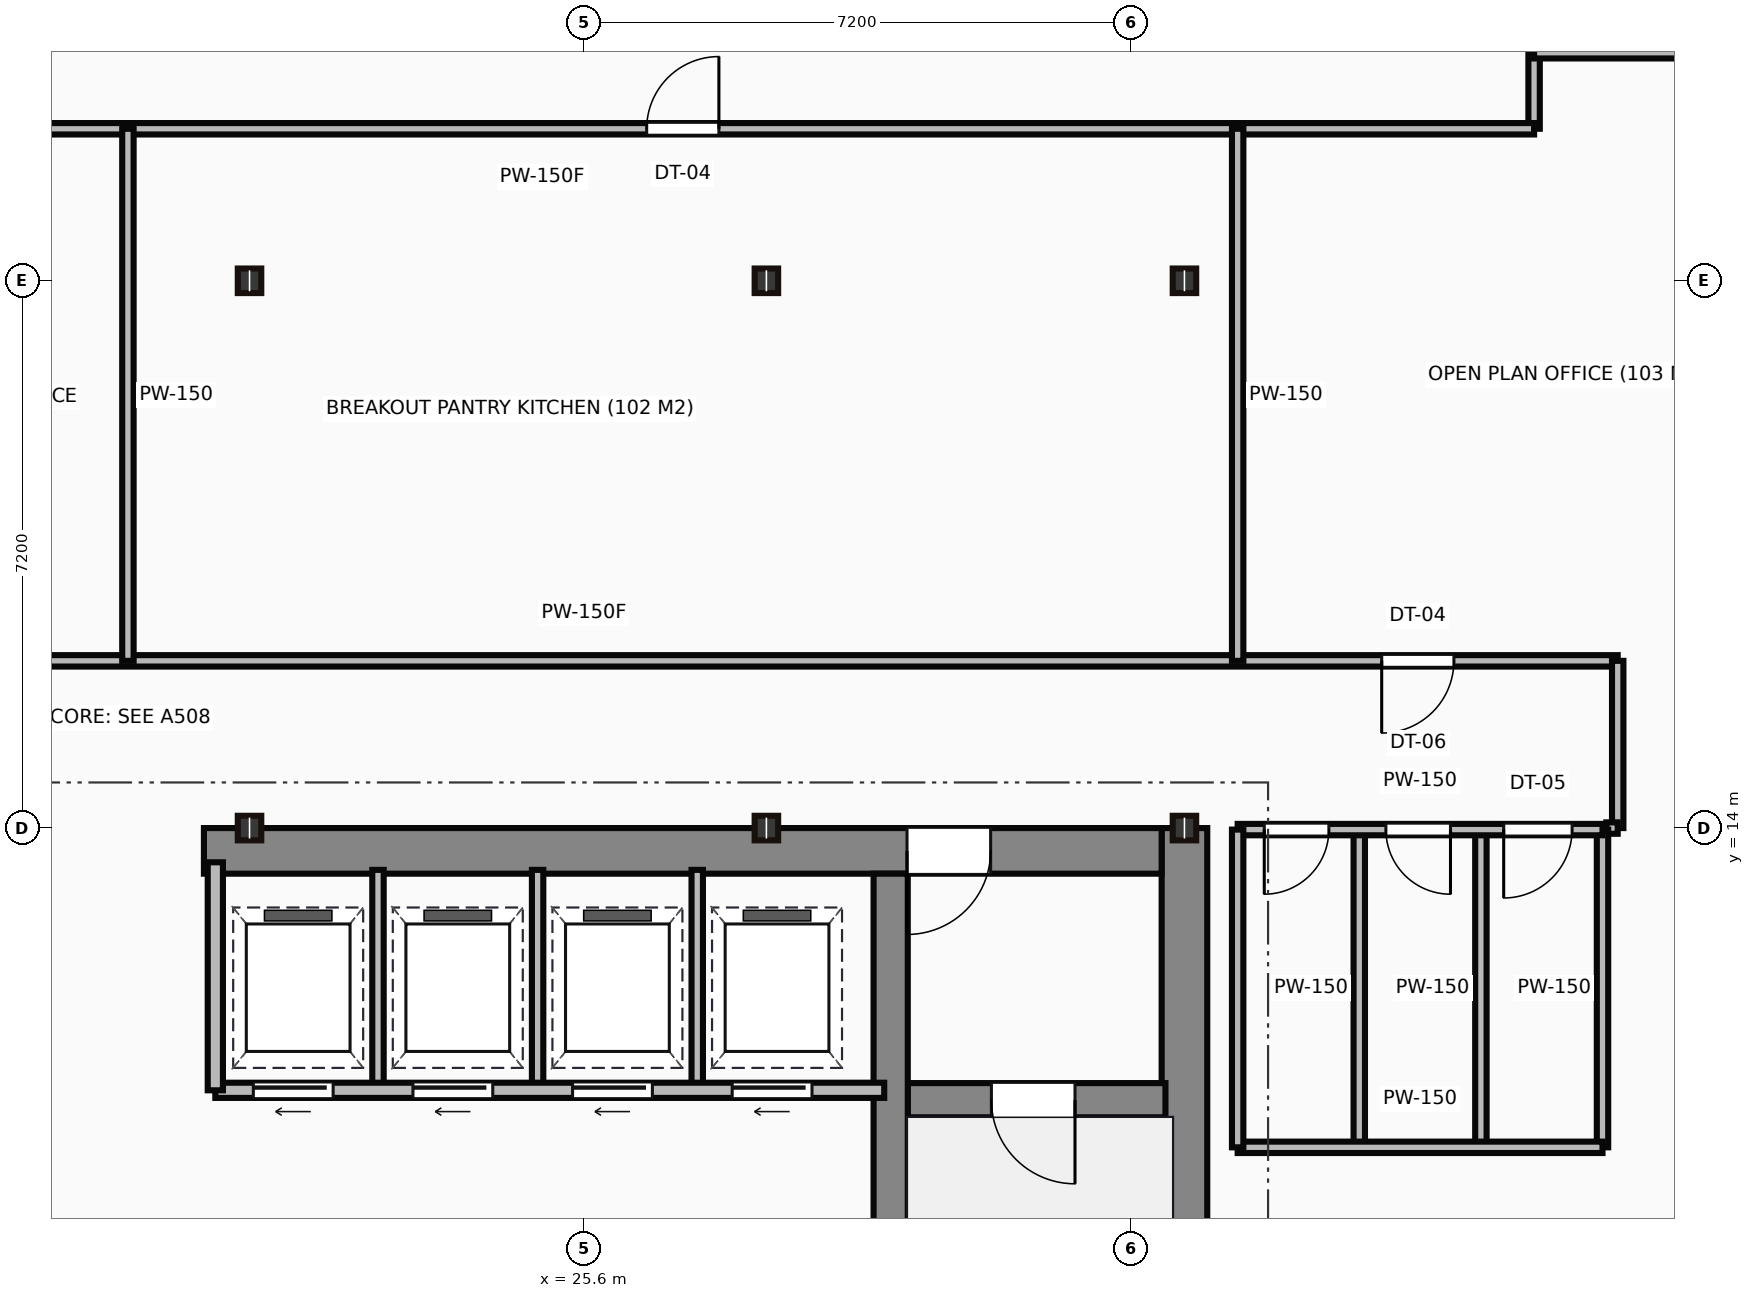
"""IFC4 building model, lengths in metres.
Left out: names, types, materials, properties, quantities, classifications, styles, units other than length and angle.
Written with IfcOpenShell. Run it as: python <this file> out.ifc"""

import sys

from ifc_helpers import new_model, si_unit, direction, frame, frame_2d, origin, origin_2d, place, context, subcontext, project, spatial, rectangle, i_section, extrude, source, transform, mapped, element, fill, save


model = new_model("IFC4")
c1 = context("Model", 3, precision=1e-05, world=origin(), true_north=direction((0.0, 1.0)))
c2 = subcontext(c1, "Body", "Model", "MODEL_VIEW")
j1 = project(units=[si_unit("LENGTHUNIT", "METRE"), si_unit("PLANEANGLEUNIT", "RADIAN")], contexts=[c1])
p1 = place(None, origin())
s1 = spatial("IfcSite", under=j1, at=p1, CompositionType="ELEMENT")
p2 = place(p1, origin())
s2 = spatial("IfcBuilding", under=s1, at=p2, CompositionType="ELEMENT")
p3 = place(p2, frame((0.0, 0.0, 188.6)))
s3 = spatial("IfcBuildingStorey", under=s2, at=p3, CompositionType="ELEMENT", Elevation=188.6)
m1 = source(origin(), c2, "Body", "SweptSolid", [
    extrude(rectangle(XDim=13.1, YDim=0.6, at=frame_2d((6.55, 0.0))), origin(), (0.0, 0.0, 1.0), 3.65),
])
p4 = place(p3, frame((33.5, 0.9, 0.0), z_axis=(0.0, 0.0, 1.0), x_axis=(0.0, 1.0, 0.0)))
e1 = element("IfcWall", 1, at=p4, inside=s3, PredefinedType="SHEAR", context=c2, shape_type="MappedRepresentation", body=[
    mapped(m1, transform((0.0, 0.0, 0.0))),
])
m2 = source(origin(), c2, "Body", "SweptSolid", [
    extrude(rectangle(XDim=12.6, YDim=0.6, at=frame_2d((6.3, 0.0))), origin(), (0.0, 0.0, 1.0), 3.65),
])
p5 = place(p3, frame((20.6, 13.7, 0.0), z_axis=(0.0, 0.0, 1.0), x_axis=(1.0, 0.0, 0.0)))
e2 = element("IfcWall", 2, at=p5, inside=s3, PredefinedType="SHEAR", context=c2, shape_type="MappedRepresentation", body=[
    mapped(m2, transform((0.0, 0.0, 0.0))),
])
p6 = place(p5, frame((9.25, 0.0, 0.0)))
e3 = element("IfcOpeningElement", 3, at=p6, cuts=e2, PredefinedType="OPENING", context=c2, shape_type="SweptSolid", body=[
    extrude(rectangle(XDim=1.1, YDim=2.15, at=frame_2d((0.55, 1.075))), frame((0.0, 0.31, 0.0), z_axis=(0.0, -1.0, 0.0), x_axis=(1.0, 0.0, 0.0)), (0.0, 0.0, 1.0), 0.62),
])
m3 = source(origin(), c2, "Body", "SweptSolid", [
    extrude(rectangle(XDim=12.5, YDim=0.45, at=frame_2d((6.25, 0.0))), origin(), (0.0, 0.0, 1.0), 3.65),
])
p7 = place(p3, frame((29.635, 0.9, 0.0), z_axis=(0.0, 0.0, 1.0), x_axis=(0.0, 1.0, 0.0)))
e4 = element("IfcWall", 4, at=p7, inside=s3, PredefinedType="SHEAR", context=c2, shape_type="MappedRepresentation", body=[
    mapped(m3, transform((0.0, 0.0, 0.0))),
])
m4 = source(origin(), c2, "Body", "SweptSolid", [
    extrude(rectangle(XDim=3.39, YDim=0.45, at=frame_2d((1.695, 0.0))), origin(), (0.0, 0.0, 1.0), 3.65),
])
p8 = place(p3, frame((29.86, 10.42, 0.0), z_axis=(0.0, 0.0, 1.0), x_axis=(1.0, 0.0, 0.0)))
e5 = element("IfcWall", 5, at=p8, inside=s3, PredefinedType="SHEAR", context=c2, shape_type="MappedRepresentation", body=[
    mapped(m4, transform((0.0, 0.0, 0.0))),
])
p9 = place(p8, frame((1.1, 0.0, 0.0)))
e6 = element("IfcOpeningElement", 6, at=p9, cuts=e5, PredefinedType="OPENING", context=c2, shape_type="SweptSolid", body=[
    extrude(rectangle(XDim=1.1, YDim=2.15, at=frame_2d((0.55, 1.075))), frame((0.0, 0.235, 0.0), z_axis=(0.0, -1.0, 0.0), x_axis=(1.0, 0.0, 0.0)), (0.0, 0.0, 1.0), 0.47),
])
m5 = source(origin(), c2, "Body", "SweptSolid", [
    extrude(i_section(OverallWidth=0.309, OverallDepth=0.323, WebThickness=0.014, FlangeThickness=0.023, at=origin_2d()), origin(), (0.0, 0.0, 1.0), 3.65),
])
for number, where, z_axis, x_axis in (
    (7, (21.2, 14.0, 0.0), (0.0, 0.0, 1.0), (1.0, 0.0, 0.0)),
    (8, (21.2, 21.2, 0.0), (0.0, 0.0, 1.0), (1.0, 0.0, 0.0)),
    (9, (28.0, 14.0, 0.0), (0.0, 0.0, 1.0), (1.0, 0.0, 0.0)),
    (10, (28.0, 21.2, 0.0), (0.0, 0.0, 1.0), (1.0, 0.0, 0.0)),
    (11, (33.5, 14.0, 0.0), (0.0, 0.0, 1.0), (1.0, 0.0, 0.0)),
    (12, (33.5, 21.2, 0.0), (0.0, 0.0, 1.0), (1.0, 0.0, 0.0)),
):
    element("IfcColumn", number, at=place(p3, frame(where, z_axis=z_axis, x_axis=x_axis)), inside=s3, PredefinedType="COLUMN", context=c2, shape_type="MappedRepresentation", body=[
        mapped(m5, transform((0.0, 0.0, 0.0))),
    ])
m6 = source(origin(), c2, "Body", "SweptSolid", [
    extrude(rectangle(XDim=8.8, YDim=0.2, at=frame_2d((4.4, 0.0))), origin(), (0.0, 0.0, 1.0), 3.4),
])
p10 = place(p3, frame((20.75, 10.55, 0.0), z_axis=(0.0, 0.0, 1.0), x_axis=(1.0, 0.0, 0.0)))
e13 = element("IfcWall", 13, at=p10, inside=s3, PredefinedType="PARTITIONING", context=c2, shape_type="MappedRepresentation", body=[
    mapped(m6, transform((0.0, 0.0, 0.0))),
])
p11 = place(p10, frame((0.5, 0.0, 0.0)))
e14 = element("IfcOpeningElement", 14, at=p11, cuts=e13, PredefinedType="OPENING", context=c2, shape_type="SweptSolid", body=[
    extrude(rectangle(XDim=1.05, YDim=2.15, at=frame_2d((0.525, 1.075))), frame((0.0, 0.11, 0.0), z_axis=(0.0, -1.0, 0.0), x_axis=(1.0, 0.0, 0.0)), (0.0, 0.0, 1.0), 0.22),
])
p12 = place(p10, frame((2.6, 0.0, 0.0)))
e15 = element("IfcOpeningElement", 15, at=p12, cuts=e13, PredefinedType="OPENING", context=c2, shape_type="SweptSolid", body=[
    extrude(rectangle(XDim=1.05, YDim=2.15, at=frame_2d((0.525, 1.075))), frame((0.0, 0.11, 0.0), z_axis=(0.0, -1.0, 0.0), x_axis=(1.0, 0.0, 0.0)), (0.0, 0.0, 1.0), 0.22),
])
p13 = place(p10, frame((4.7, 0.0, 0.0)))
e16 = element("IfcOpeningElement", 16, at=p13, cuts=e13, PredefinedType="OPENING", context=c2, shape_type="SweptSolid", body=[
    extrude(rectangle(XDim=1.05, YDim=2.15, at=frame_2d((0.525, 1.075))), frame((0.0, 0.11, 0.0), z_axis=(0.0, -1.0, 0.0), x_axis=(1.0, 0.0, 0.0)), (0.0, 0.0, 1.0), 0.22),
])
p14 = place(p10, frame((6.8, 0.0, 0.0)))
e17 = element("IfcOpeningElement", 17, at=p14, cuts=e13, PredefinedType="OPENING", context=c2, shape_type="SweptSolid", body=[
    extrude(rectangle(XDim=1.05, YDim=2.15, at=frame_2d((0.525, 1.075))), frame((0.0, 0.11, 0.0), z_axis=(0.0, -1.0, 0.0), x_axis=(1.0, 0.0, 0.0)), (0.0, 0.0, 1.0), 0.22),
])
m7 = source(origin(), c2, "Body", "SweptSolid", [
    extrude(rectangle(XDim=3.0, YDim=0.2, at=frame_2d((1.5, 0.0))), origin(), (0.0, 0.0, 1.0), 3.4),
])
p15 = place(p3, frame((20.75, 10.55, 0.0), z_axis=(0.0, 0.0, 1.0), x_axis=(0.0, 1.0, 0.0)))
e18 = element("IfcWall", 18, at=p15, inside=s3, PredefinedType="PARTITIONING", context=c2, shape_type="MappedRepresentation", body=[
    mapped(m7, transform((0.0, 0.0, 0.0))),
])
m8 = source(origin(), c2, "Body", "SweptSolid", [
    extrude(rectangle(XDim=2.85, YDim=0.15, at=frame_2d((1.425, 0.0))), origin(), (0.0, 0.0, 1.0), 3.4),
])
for number, where, z_axis, x_axis in (
    (19, (22.89, 10.6, 0.0), (0.0, 0.0, 1.0), (0.0, 1.0, 0.0)),
    (20, (24.99, 10.6, 0.0), (0.0, 0.0, 1.0), (0.0, 1.0, 0.0)),
    (21, (27.09, 10.6, 0.0), (0.0, 0.0, 1.0), (0.0, 1.0, 0.0)),
):
    element("IfcWall", number, at=place(p3, frame(where, z_axis=z_axis, x_axis=x_axis)), inside=s3, PredefinedType="PARTITIONING", context=c2, shape_type="MappedRepresentation", body=[
        mapped(m8, transform((0.0, 0.0, 0.0))),
    ])
m9 = source(origin(), c2, "Body", "SweptSolid", [
    extrude(rectangle(XDim=4.8, YDim=0.15, at=frame_2d((2.4, 0.0))), origin(), (0.0, 0.0, 1.0), 2.787),
])
p16 = place(p3, frame((34.2, 13.98, 0.0), z_axis=(0.0, 0.0, 1.0), x_axis=(1.0, 0.0, 0.0)))
e22 = element("IfcWall", 22, at=p16, inside=s3, PredefinedType="PARTITIONING", context=c2, shape_type="MappedRepresentation", body=[
    mapped(m9, transform((0.0, 0.0, 0.0))),
])
p17 = place(p16, frame((0.35, 0.0, 0.0)))
e23 = element("IfcOpeningElement", 23, at=p17, cuts=e22, PredefinedType="OPENING", context=c2, shape_type="SweptSolid", body=[
    extrude(rectangle(XDim=0.85, YDim=2.1, at=frame_2d((0.425, 1.05))), frame((0.0, 0.085, 0.0), z_axis=(0.0, -1.0, 0.0), x_axis=(1.0, 0.0, 0.0)), (0.0, 0.0, 1.0), 0.17),
])
p18 = place(p16, frame((1.95, 0.0, 0.0)))
e24 = element("IfcOpeningElement", 24, at=p18, cuts=e22, PredefinedType="OPENING", context=c2, shape_type="SweptSolid", body=[
    extrude(rectangle(XDim=0.85, YDim=2.1, at=frame_2d((0.425, 1.05))), frame((0.0, 0.085, 0.0), z_axis=(0.0, -1.0, 0.0), x_axis=(1.0, 0.0, 0.0)), (0.0, 0.0, 1.0), 0.17),
])
p19 = place(p16, frame((3.5, 0.0, 0.0)))
e25 = element("IfcOpeningElement", 25, at=p19, cuts=e22, PredefinedType="OPENING", context=c2, shape_type="SweptSolid", body=[
    extrude(rectangle(XDim=0.9, YDim=2.1, at=frame_2d((0.45, 1.05))), frame((0.0, 0.085, 0.0), z_axis=(0.0, -1.0, 0.0), x_axis=(1.0, 0.0, 0.0)), (0.0, 0.0, 1.0), 0.17),
])
m10 = source(origin(), c2, "Body", "SweptSolid", [
    extrude(rectangle(XDim=4.8, YDim=0.15, at=frame_2d((2.4, 0.0))), origin(), (0.0, 0.0, 1.0), 3.4),
])
p20 = place(p3, frame((34.2, 9.8, 0.0), z_axis=(0.0, 0.0, 1.0), x_axis=(1.0, 0.0, 0.0)))
e26 = element("IfcWall", 26, at=p20, inside=s3, PredefinedType="PARTITIONING", context=c2, shape_type="MappedRepresentation", body=[
    mapped(m10, transform((0.0, 0.0, 0.0))),
])
m11 = source(origin(), c2, "Body", "SweptSolid", [
    extrude(rectangle(XDim=4.18, YDim=0.15, at=frame_2d((2.09, 0.0))), origin(), (0.0, 0.0, 1.0), 3.4),
])
for number, where, z_axis, x_axis in (
    (27, (39.0, 9.8, 0.0), (0.0, 0.0, 1.0), (0.0, 1.0, 0.0)),
    (28, (34.2, 9.8, 0.0), (0.0, 0.0, 1.0), (0.0, 1.0, 0.0)),
    (29, (35.8, 9.8, 0.0), (0.0, 0.0, 1.0), (0.0, 1.0, 0.0)),
    (30, (37.4, 9.8, 0.0), (0.0, 0.0, 1.0), (0.0, 1.0, 0.0)),
):
    element("IfcWall", number, at=place(p3, frame(where, z_axis=z_axis, x_axis=x_axis)), inside=s3, PredefinedType="PARTITIONING", context=c2, shape_type="MappedRepresentation", body=[
        mapped(m11, transform((0.0, 0.0, 0.0))),
    ])
m12 = source(origin(), c2, "Body", "SweptSolid", [
    extrude(rectangle(XDim=2.05, YDim=0.15, at=frame_2d((1.025, 0.0))), origin(), (0.0, 0.0, 1.0), 3.4),
])
p21 = place(p3, frame((38.1, 25.25, 0.0), z_axis=(0.0, 0.0, 1.0), x_axis=(0.0, -1.0, 0.0)))
e31 = element("IfcWall", 31, at=p21, inside=s3, PredefinedType="PARTITIONING", context=c2, shape_type="MappedRepresentation", body=[
    mapped(m12, transform((0.0, 0.0, 0.0))),
])
m13 = source(origin(), c2, "Body", "SweptSolid", [
    extrude(rectangle(XDim=26.1, YDim=0.15, at=frame_2d((13.05, 0.0))), origin(), (0.0, 0.0, 1.0), 3.4),
])
p22 = place(p3, frame((38.1, 23.2, 0.0), z_axis=(0.0, 0.0, 1.0), x_axis=(-1.0, 0.0, 0.0)))
e32 = element("IfcWall", 32, at=p22, inside=s3, PredefinedType="PARTITIONING", context=c2, shape_type="MappedRepresentation", body=[
    mapped(m13, transform((0.0, 0.0, 0.0))),
])
p23 = place(p22, frame((10.725, 0.0, 0.0)))
e33 = element("IfcOpeningElement", 33, at=p23, cuts=e32, PredefinedType="OPENING", context=c2, shape_type="SweptSolid", body=[
    extrude(rectangle(XDim=0.95, YDim=2.15, at=frame_2d((0.475, 1.075))), frame((0.0, 0.085, 0.0), z_axis=(0.0, -1.0, 0.0), x_axis=(1.0, 0.0, 0.0)), (0.0, 0.0, 1.0), 0.17),
])
m14 = source(origin(), c2, "Body", "SweptSolid", [
    extrude(rectangle(XDim=27.2, YDim=0.15, at=frame_2d((13.6, 0.0))), origin(), (0.0, 0.0, 1.0), 3.4),
])
p24 = place(p3, frame((12.0, 16.2, 0.0), z_axis=(0.0, 0.0, 1.0), x_axis=(1.0, 0.0, 0.0)))
e34 = element("IfcWall", 34, at=p24, inside=s3, PredefinedType="PARTITIONING", context=c2, shape_type="MappedRepresentation", body=[
    mapped(m14, transform((0.0, 0.0, 0.0))),
])
p25 = place(p24, frame((3.455, 0.0, 0.0)))
e35 = element("IfcOpeningElement", 35, at=p25, cuts=e34, PredefinedType="OPENING", context=c2, shape_type="SweptSolid", body=[
    extrude(rectangle(XDim=0.95, YDim=2.15, at=frame_2d((0.475, 1.075))), frame((0.0, 0.085, 0.0), z_axis=(0.0, -1.0, 0.0), x_axis=(1.0, 0.0, 0.0)), (0.0, 0.0, 1.0), 0.17),
])
p26 = place(p24, frame((24.095, 0.0, 0.0)))
e36 = element("IfcOpeningElement", 36, at=p26, cuts=e34, PredefinedType="OPENING", context=c2, shape_type="SweptSolid", body=[
    extrude(rectangle(XDim=0.95, YDim=2.15, at=frame_2d((0.475, 1.075))), frame((0.0, 0.085, 0.0), z_axis=(0.0, -1.0, 0.0), x_axis=(1.0, 0.0, 0.0)), (0.0, 0.0, 1.0), 0.17),
])
m15 = source(origin(), c2, "Body", "SweptSolid", [
    extrude(rectangle(XDim=2.2, YDim=0.15, at=frame_2d((1.1, 0.0))), origin(), (0.0, 0.0, 1.0), 3.4),
])
p27 = place(p3, frame((39.2, 16.2, 0.0), z_axis=(0.0, 0.0, 1.0), x_axis=(0.0, -1.0, 0.0)))
e37 = element("IfcWall", 37, at=p27, inside=s3, PredefinedType="PARTITIONING", context=c2, shape_type="MappedRepresentation", body=[
    mapped(m15, transform((0.0, 0.0, 0.0))),
])
m16 = source(origin(), c2, "Body", "SweptSolid", [
    extrude(rectangle(XDim=0.15, YDim=0.15, at=frame_2d((0.075, 0.0))), origin(), (0.0, 0.0, 1.0), 3.4),
])
p28 = place(p3, frame((39.2, 14.0, 0.0), z_axis=(0.0, 0.0, 1.0), x_axis=(-1.0, 0.0, 0.0)))
e38 = element("IfcWall", 38, at=p28, inside=s3, PredefinedType="PARTITIONING", context=c2, shape_type="MappedRepresentation", body=[
    mapped(m16, transform((0.0, 0.0, 0.0))),
])
m17 = source(origin(), c2, "Body", "SweptSolid", [
    extrude(rectangle(XDim=7.0, YDim=0.15, at=frame_2d((3.5, 0.0))), origin(), (0.0, 0.0, 1.0), 3.4),
])
for number, where, z_axis, x_axis in (
    (39, (19.6, 23.2, 0.0), (0.0, 0.0, 1.0), (0.0, -1.0, 0.0)),
    (40, (34.2, 23.2, 0.0), (0.0, 0.0, 1.0), (0.0, -1.0, 0.0)),
):
    element("IfcWall", number, at=place(p3, frame(where, z_axis=z_axis, x_axis=x_axis)), inside=s3, PredefinedType="PARTITIONING", context=c2, shape_type="MappedRepresentation", body=[
        mapped(m17, transform((0.0, 0.0, 0.0))),
    ])
m18 = source(origin(), c2, "Body", "SweptSolid", [
    extrude(rectangle(XDim=4.88, YDim=0.15, at=frame_2d((2.44, 0.0))), origin(), (0.0, 0.0, 1.0), 3.4),
])
p29 = place(p3, frame((42.98, 24.2, 0.0), z_axis=(0.0, 0.0, 1.0), x_axis=(-1.0, 0.0, 0.0)))
e41 = element("IfcWall", 41, at=p29, inside=s3, PredefinedType="PARTITIONING", context=c2, shape_type="MappedRepresentation", body=[
    mapped(m18, transform((0.0, 0.0, 0.0))),
])
m19 = source(origin(), c2, "Body", "SweptSolid", [
    extrude(rectangle(XDim=1.1, YDim=2.15, at=frame_2d((0.55, 1.075))), frame((0.0, 0.025, 0.0), z_axis=(0.0, -1.0, 0.0), x_axis=(1.0, 0.0, 0.0)), (0.0, 0.0, 1.0), 0.05),
])
p30 = place(p9, frame((1.1, 0.0, 0.0), z_axis=(0.0, 0.0, 1.0), x_axis=(-1.0, 0.0, 0.0)))
e42 = element("IfcDoor", 42, at=p30, inside=s3, OperationType="SINGLE_SWING_RIGHT", PredefinedType="DOOR", context=c2, shape_type="MappedRepresentation", body=[
    mapped(m19, transform((0.0, 0.0, 0.0))),
])
fill(e6, e42)
p31 = place(p6, origin())
e43 = element("IfcDoor", 43, at=p31, inside=s3, OperationType="SINGLE_SWING_LEFT", PredefinedType="DOOR", context=c2, shape_type="MappedRepresentation", body=[
    mapped(m19, transform((0.0, 0.0, 0.0))),
])
fill(e3, e43)
m20 = source(origin(), c2, "Body", "SweptSolid", [
    extrude(rectangle(XDim=1.05, YDim=2.15, at=frame_2d((0.525, 1.075))), frame((0.0, 0.025, 0.0), z_axis=(0.0, -1.0, 0.0), x_axis=(1.0, 0.0, 0.0)), (0.0, 0.0, 1.0), 0.05),
])
p32 = place(p11, frame((1.05, 0.0, 0.0), z_axis=(0.0, 0.0, 1.0), x_axis=(-1.0, 0.0, 0.0)))
e44 = element("IfcDoor", 44, at=p32, inside=s3, OperationType="SLIDING_TO_LEFT", PredefinedType="DOOR", context=c2, shape_type="MappedRepresentation", body=[
    mapped(m20, transform((0.0, 0.0, 0.0))),
])
fill(e14, e44)
p33 = place(p12, frame((1.05, 0.0, 0.0), z_axis=(0.0, 0.0, 1.0), x_axis=(-1.0, 0.0, 0.0)))
e45 = element("IfcDoor", 45, at=p33, inside=s3, OperationType="SLIDING_TO_LEFT", PredefinedType="DOOR", context=c2, shape_type="MappedRepresentation", body=[
    mapped(m20, transform((0.0, 0.0, 0.0))),
])
fill(e15, e45)
p34 = place(p13, frame((1.05, 0.0, 0.0), z_axis=(0.0, 0.0, 1.0), x_axis=(-1.0, 0.0, 0.0)))
e46 = element("IfcDoor", 46, at=p34, inside=s3, OperationType="SLIDING_TO_LEFT", PredefinedType="DOOR", context=c2, shape_type="MappedRepresentation", body=[
    mapped(m20, transform((0.0, 0.0, 0.0))),
])
fill(e16, e46)
p35 = place(p14, frame((1.05, 0.0, 0.0), z_axis=(0.0, 0.0, 1.0), x_axis=(-1.0, 0.0, 0.0)))
e47 = element("IfcDoor", 47, at=p35, inside=s3, OperationType="SLIDING_TO_LEFT", PredefinedType="DOOR", context=c2, shape_type="MappedRepresentation", body=[
    mapped(m20, transform((0.0, 0.0, 0.0))),
])
fill(e17, e47)
m21 = source(origin(), c2, "Body", "SweptSolid", [
    extrude(rectangle(XDim=0.85, YDim=2.1, at=frame_2d((0.425, 1.05))), frame((0.0, 0.025, 0.0), z_axis=(0.0, -1.0, 0.0), x_axis=(1.0, 0.0, 0.0)), (0.0, 0.0, 1.0), 0.05),
])
p36 = place(p17, frame((0.85, 0.0, 0.0), z_axis=(0.0, 0.0, 1.0), x_axis=(-1.0, 0.0, 0.0)))
e48 = element("IfcDoor", 48, at=p36, inside=s3, OperationType="SINGLE_SWING_LEFT", PredefinedType="DOOR", context=c2, shape_type="MappedRepresentation", body=[
    mapped(m21, transform((0.0, 0.0, 0.0))),
])
fill(e23, e48)
p37 = place(p18, frame((0.85, 0.0, 0.0), z_axis=(0.0, 0.0, 1.0), x_axis=(-1.0, 0.0, 0.0)))
e49 = element("IfcDoor", 49, at=p37, inside=s3, OperationType="SINGLE_SWING_RIGHT", PredefinedType="DOOR", context=c2, shape_type="MappedRepresentation", body=[
    mapped(m21, transform((0.0, 0.0, 0.0))),
])
fill(e24, e49)
m22 = source(origin(), c2, "Body", "SweptSolid", [
    extrude(rectangle(XDim=0.9, YDim=2.1, at=frame_2d((0.45, 1.05))), frame((0.0, 0.025, 0.0), z_axis=(0.0, -1.0, 0.0), x_axis=(1.0, 0.0, 0.0)), (0.0, 0.0, 1.0), 0.05),
])
p38 = place(p19, frame((0.9, 0.0, 0.0), z_axis=(0.0, 0.0, 1.0), x_axis=(-1.0, 0.0, 0.0)))
e50 = element("IfcDoor", 50, at=p38, inside=s3, OperationType="SINGLE_SWING_LEFT", PredefinedType="DOOR", context=c2, shape_type="MappedRepresentation", body=[
    mapped(m22, transform((0.0, 0.0, 0.0))),
])
fill(e25, e50)
m23 = source(origin(), c2, "Body", "SweptSolid", [
    extrude(rectangle(XDim=0.95, YDim=2.15, at=frame_2d((0.475, 1.075))), frame((0.0, 0.025, 0.0), z_axis=(0.0, -1.0, 0.0), x_axis=(1.0, 0.0, 0.0)), (0.0, 0.0, 1.0), 0.05),
])
p39 = place(p23, origin())
e51 = element("IfcDoor", 51, at=p39, inside=s3, OperationType="SINGLE_SWING_LEFT", PredefinedType="DOOR", context=c2, shape_type="MappedRepresentation", body=[
    mapped(m23, transform((0.0, 0.0, 0.0))),
])
fill(e33, e51)
p40 = place(p26, origin())
e52 = element("IfcDoor", 52, at=p40, inside=s3, OperationType="SINGLE_SWING_LEFT", PredefinedType="DOOR", context=c2, shape_type="MappedRepresentation", body=[
    mapped(m23, transform((0.0, 0.0, 0.0))),
])
fill(e36, e52)
save(model, sys.argv[1])
